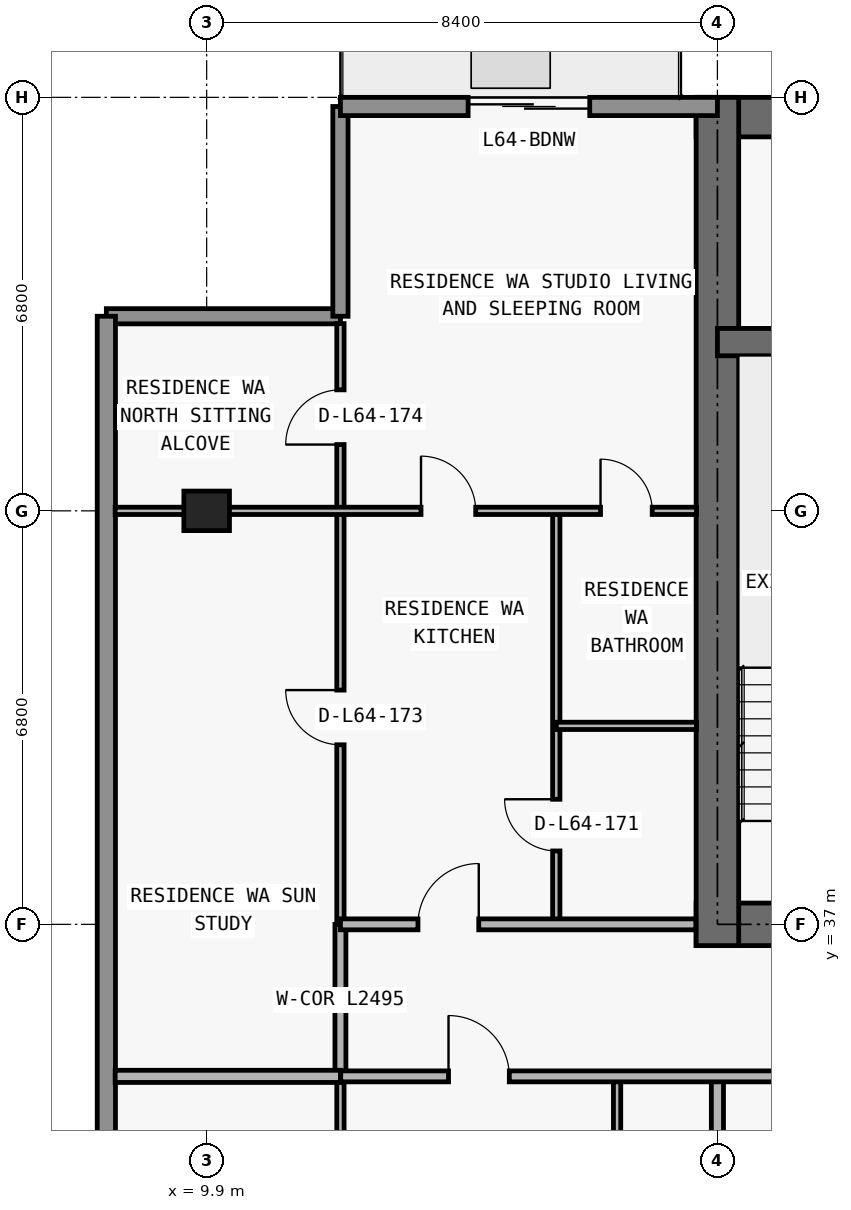
"""IFC4 building model, lengths in metres.
Left out: names, types, materials, properties, quantities, classifications, styles, units other than length and angle.
Written with IfcOpenShell. Run it as: python <this file> out.ifc"""

import sys

from ifc_helpers import new_model, si_unit, direction, frame, frame_2d, origin, origin_2d, place, context, subcontext, project, spatial, rectangle, extrude, element, fill, save


model = new_model("IFC4")
c1 = context("Model", 3, precision=1e-05, world=origin(), true_north=direction((0.0, 1.0)))
c2 = subcontext(c1, "Body", "Model", "MODEL_VIEW")
j1 = project(units=[si_unit("LENGTHUNIT", "METRE"), si_unit("PLANEANGLEUNIT", "RADIAN")], contexts=[c1])
p1 = place(None, origin())
s1 = spatial("IfcSite", under=j1, at=p1, CompositionType="ELEMENT")
p2 = place(p1, origin())
s2 = spatial("IfcBuilding", under=s1, at=p2, CompositionType="ELEMENT")
p3 = place(p2, frame((0.0, 0.0, 229.8)))
s3 = spatial("IfcBuildingStorey", under=s2, at=p3, CompositionType="ELEMENT", Elevation=229.8)
p4 = place(p3, frame((9.9, 43.8, 0.0), z_axis=(0.0, 0.0, 1.0), x_axis=(1.0, 0.0, 0.0)))
e1 = element("IfcColumn", 1, at=p4, inside=s3, PredefinedType="COLUMN", context=c2, shape_type="SweptSolid", body=[
    extrude(rectangle(XDim=0.75, YDim=0.65, at=origin_2d()), origin(), (0.0, 0.0, 1.0), 3.05),
])
p5 = place(p3, frame((17.95, 37.0, 0.0), z_axis=(0.0, 0.0, 1.0), x_axis=(1.0, 0.0, 0.0)))
e2 = element("IfcWall", 2, at=p5, inside=s3, PredefinedType="SHEAR", context=c2, shape_type="SweptSolid", body=[
    extrude(rectangle(XDim=41.9, YDim=0.7, at=frame_2d((20.95, 0.0))), origin(), (0.0, 0.0, 1.0), 3.05),
])
p6 = place(p5, frame((14.35, 0.0, 0.0)))
e3 = element("IfcOpeningElement", 3, at=p6, cuts=e2, PredefinedType="OPENING", context=c2, shape_type="SweptSolid", body=[
    extrude(rectangle(XDim=1.1, YDim=2.15, at=frame_2d((0.55, 1.075))), frame((0.0, 0.36, 0.0), z_axis=(0.0, -1.0, 0.0), x_axis=(1.0, 0.0, 0.0)), (0.0, 0.0, 1.0), 0.72),
])
p7 = place(p5, frame((6.2, 0.0, 0.0)))
e4 = element("IfcOpeningElement", 4, at=p7, cuts=e2, PredefinedType="OPENING", context=c2, shape_type="SweptSolid", body=[
    extrude(rectangle(XDim=1.05, YDim=2.15, at=frame_2d((0.525, 1.075))), frame((0.0, 0.36, 0.0), z_axis=(0.0, -1.0, 0.0), x_axis=(1.0, 0.0, 0.0)), (0.0, 0.0, 1.0), 0.72),
])
p8 = place(p5, frame((34.7, 0.0, 0.0)))
e5 = element("IfcOpeningElement", 5, at=p8, cuts=e2, PredefinedType="OPENING", context=c2, shape_type="SweptSolid", body=[
    extrude(rectangle(XDim=1.05, YDim=2.15, at=frame_2d((0.525, 1.075))), frame((0.0, 0.36, 0.0), z_axis=(0.0, -1.0, 0.0), x_axis=(1.0, 0.0, 0.0)), (0.0, 0.0, 1.0), 0.72),
])
p9 = place(p5, frame((10.812, 0.0, 0.0)))
e6 = element("IfcOpeningElement", 6, at=p9, cuts=e2, PredefinedType="OPENING", context=c2, shape_type="SweptSolid", body=[
    extrude(rectangle(XDim=1.05, YDim=2.15, at=frame_2d((0.525, 1.075))), frame((0.0, 0.36, 0.0), z_axis=(0.0, -1.0, 0.0), x_axis=(1.0, 0.0, 0.0)), (0.0, 0.0, 1.0), 0.72),
])
p10 = place(p5, frame((24.05, 0.0, 0.0)))
e7 = element("IfcOpeningElement", 7, at=p10, cuts=e2, PredefinedType="OPENING", context=c2, shape_type="SweptSolid", body=[
    extrude(rectangle(XDim=1.05, YDim=2.15, at=frame_2d((0.525, 1.075))), frame((0.0, 0.36, 0.0), z_axis=(0.0, -1.0, 0.0), x_axis=(1.0, 0.0, 0.0)), (0.0, 0.0, 1.0), 0.72),
])
p11 = place(p3, frame((17.95, 50.275, 0.0), z_axis=(0.0, 0.0, 1.0), x_axis=(1.0, 0.0, 0.0)))
e8 = element("IfcWall", 8, at=p11, inside=s3, PredefinedType="SHEAR", context=c2, shape_type="SweptSolid", body=[
    extrude(rectangle(XDim=41.9, YDim=0.65, at=frame_2d((20.95, 0.0))), origin(), (0.0, 0.0, 1.0), 3.05),
])
p12 = place(p3, frame((18.3, 36.65, 0.0), z_axis=(0.0, 0.0, 1.0), x_axis=(0.0, 1.0, 0.0)))
e9 = element("IfcWall", 9, at=p12, inside=s3, PredefinedType="SHEAR", context=c2, shape_type="SweptSolid", body=[
    extrude(rectangle(XDim=13.95, YDim=0.7, at=frame_2d((6.975, 0.0))), origin(), (0.0, 0.0, 1.0), 3.05),
])
p13 = place(p3, frame((18.3, 46.575, 0.0), z_axis=(0.0, 0.0, 1.0), x_axis=(1.0, 0.0, 0.0)))
e10 = element("IfcWall", 10, at=p13, inside=s3, PredefinedType="SHEAR", context=c2, shape_type="SweptSolid", body=[
    extrude(rectangle(XDim=41.2, YDim=0.45, at=frame_2d((20.6, 0.0))), origin(), (0.0, 0.0, 1.0), 3.05),
])
p14 = place(p13, frame((7.575, 0.0, 0.0)))
e11 = element("IfcOpeningElement", 11, at=p14, cuts=e10, PredefinedType="OPENING", context=c2, shape_type="SweptSolid", body=[
    extrude(rectangle(XDim=1.05, YDim=2.15, at=frame_2d((0.525, 1.075))), frame((0.0, 0.235, 0.0), z_axis=(0.0, -1.0, 0.0), x_axis=(1.0, 0.0, 0.0)), (0.0, 0.0, 1.0), 0.47),
])
p15 = place(p13, frame((32.625, 0.0, 0.0)))
e12 = element("IfcOpeningElement", 12, at=p15, cuts=e10, PredefinedType="OPENING", context=c2, shape_type="SweptSolid", body=[
    extrude(rectangle(XDim=1.05, YDim=2.15, at=frame_2d((0.525, 1.075))), frame((0.0, 0.235, 0.0), z_axis=(0.0, -1.0, 0.0), x_axis=(1.0, 0.0, 0.0)), (0.0, 0.0, 1.0), 0.47),
])
p16 = place(p3, frame((8.25, 47.0, 0.0), z_axis=(0.0, 0.0, 1.0), x_axis=(1.0, 0.0, 0.0)))
e13 = element("IfcWall", 13, at=p16, inside=s3, PredefinedType="ELEMENTEDWALL", context=c2, shape_type="SweptSolid", body=[
    extrude(rectangle(XDim=3.85, YDim=0.25, at=frame_2d((1.925, 0.0))), origin(), (0.0, 0.0, 1.0), 3.05),
])
p17 = place(p3, frame((12.1, 47.0, 0.0), z_axis=(0.0, 0.0, 1.0), x_axis=(0.0, 1.0, 0.0)))
e14 = element("IfcWall", 14, at=p17, inside=s3, PredefinedType="ELEMENTEDWALL", context=c2, shape_type="SweptSolid", body=[
    extrude(rectangle(XDim=3.45, YDim=0.25, at=frame_2d((1.725, 0.0))), origin(), (0.0, 0.0, 1.0), 3.05),
])
p18 = place(p3, frame((8.25, 30.15, 0.0), z_axis=(0.0, 0.0, 1.0), x_axis=(0.0, 1.0, 0.0)))
e15 = element("IfcWall", 15, at=p18, inside=s3, PredefinedType="STANDARD", context=c2, shape_type="SweptSolid", body=[
    extrude(rectangle(XDim=16.85, YDim=0.3, at=frame_2d((8.425, 0.0))), origin(), (0.0, 0.0, 1.0), 3.05),
])
p19 = place(p3, frame((12.1, 50.45, 0.0), z_axis=(0.0, 0.0, 1.0), x_axis=(1.0, 0.0, 0.0)))
e16 = element("IfcWall", 16, at=p19, inside=s3, PredefinedType="STANDARD", context=c2, shape_type="SweptSolid", body=[
    extrude(rectangle(XDim=6.2, YDim=0.3, at=frame_2d((3.1, 0.0))), origin(), (0.0, 0.0, 1.0), 3.05),
])
p20 = place(p19, frame((2.1, 0.0, 0.0)))
e17 = element("IfcOpeningElement", 17, at=p20, cuts=e16, PredefinedType="OPENING", context=c2, shape_type="SweptSolid", body=[
    extrude(rectangle(XDim=2.0, YDim=2.3, at=frame_2d((1.0, 1.15))), frame((0.0, 0.16, 0.0), z_axis=(0.0, -1.0, 0.0), x_axis=(1.0, 0.0, 0.0)), (0.0, 0.0, 1.0), 0.32),
])
p21 = place(p3, frame((12.1, 28.24, 0.0), z_axis=(0.0, 0.0, 1.0), x_axis=(0.0, 1.0, 0.0)))
e18 = element("IfcWall", 18, at=p21, inside=s3, PredefinedType="PARTITIONING", context=c2, shape_type="SweptSolid", body=[
    extrude(rectangle(XDim=6.26, YDim=0.12, at=frame_2d((3.13, 0.0))), origin(), (0.0, 0.0, 1.0), 3.05),
])
p22 = place(p3, frame((12.1, 34.505, 0.0), z_axis=(0.0, 0.0, 1.0), x_axis=(0.0, 1.0, 0.0)))
e19 = element("IfcWall", 19, at=p22, inside=s3, PredefinedType="PARTITIONING", context=c2, shape_type="SweptSolid", body=[
    extrude(rectangle(XDim=2.495, YDim=0.18, at=frame_2d((1.248, 0.0))), origin(), (0.0, 0.0, 1.0), 3.05),
])
p23 = place(p3, frame((12.1, 37.005, 0.0), z_axis=(0.0, 0.0, 1.0), x_axis=(0.0, 1.0, 0.0)))
e20 = element("IfcWall", 20, at=p23, inside=s3, PredefinedType="PARTITIONING", context=c2, shape_type="SweptSolid", body=[
    extrude(rectangle(XDim=9.875, YDim=0.12, at=frame_2d((4.938, 0.0))), origin(), (0.0, 0.0, 1.0), 3.05),
])
p24 = place(p23, frame((2.948, 0.0, 0.0)))
e21 = element("IfcOpeningElement", 21, at=p24, cuts=e20, PredefinedType="OPENING", context=c2, shape_type="SweptSolid", body=[
    extrude(rectangle(XDim=0.9, YDim=2.15, at=frame_2d((0.45, 1.075))), frame((0.0, 0.07, 0.0), z_axis=(0.0, -1.0, 0.0), x_axis=(1.0, 0.0, 0.0)), (0.0, 0.0, 1.0), 0.14),
])
p25 = place(p23, frame((7.885, 0.0, 0.0)))
e22 = element("IfcOpeningElement", 22, at=p25, cuts=e20, PredefinedType="OPENING", context=c2, shape_type="SweptSolid", body=[
    extrude(rectangle(XDim=0.9, YDim=2.15, at=frame_2d((0.45, 1.075))), frame((0.0, 0.07, 0.0), z_axis=(0.0, -1.0, 0.0), x_axis=(1.0, 0.0, 0.0)), (0.0, 0.0, 1.0), 0.14),
])
p26 = place(p3, frame((15.65, 37.0, 0.0), z_axis=(0.0, 0.0, 1.0), x_axis=(0.0, 1.0, 0.0)))
e23 = element("IfcWall", 23, at=p26, inside=s3, PredefinedType="PARTITIONING", context=c2, shape_type="SweptSolid", body=[
    extrude(rectangle(XDim=6.8, YDim=0.12, at=frame_2d((3.4, 0.0))), origin(), (0.0, 0.0, 1.0), 2.725),
])
p27 = place(p26, frame((1.207, 0.0, 0.0)))
e24 = element("IfcOpeningElement", 24, at=p27, cuts=e23, PredefinedType="OPENING", context=c2, shape_type="SweptSolid", body=[
    extrude(rectangle(XDim=0.85, YDim=2.1, at=frame_2d((0.425, 1.05))), frame((0.0, 0.07, 0.0), z_axis=(0.0, -1.0, 0.0), x_axis=(1.0, 0.0, 0.0)), (0.0, 0.0, 1.0), 0.14),
])
p28 = place(p3, frame((16.65, 28.24, 0.0), z_axis=(0.0, 0.0, 1.0), x_axis=(0.0, 1.0, 0.0)))
e25 = element("IfcWall", 25, at=p28, inside=s3, PredefinedType="PARTITIONING", context=c2, shape_type="SweptSolid", body=[
    extrude(rectangle(XDim=6.26, YDim=0.12, at=frame_2d((3.13, 0.0))), origin(), (0.0, 0.0, 1.0), 3.05),
])
p29 = place(p28, frame((2.705, 0.0, 0.0)))
e26 = element("IfcOpeningElement", 26, at=p29, cuts=e25, PredefinedType="OPENING", context=c2, shape_type="SweptSolid", body=[
    extrude(rectangle(XDim=0.85, YDim=2.1, at=frame_2d((0.425, 1.05))), frame((0.0, 0.07, 0.0), z_axis=(0.0, -1.0, 0.0), x_axis=(1.0, 0.0, 0.0)), (0.0, 0.0, 1.0), 0.14),
])
p30 = place(p3, frame((18.3, 28.24, 0.0), z_axis=(0.0, 0.0, 1.0), x_axis=(0.0, 1.0, 0.0)))
e27 = element("IfcWall", 27, at=p30, inside=s3, PredefinedType="PARTITIONING", context=c2, shape_type="SweptSolid", body=[
    extrude(rectangle(XDim=6.26, YDim=0.2, at=frame_2d((3.13, 0.0))), origin(), (0.0, 0.0, 1.0), 2.263),
])
p31 = place(p3, frame((8.395, 34.5, 0.0), z_axis=(0.0, 0.0, 1.0), x_axis=(1.0, 0.0, 0.0)))
e28 = element("IfcWall", 28, at=p31, inside=s3, PredefinedType="PARTITIONING", context=c2, shape_type="SweptSolid", body=[
    extrude(rectangle(XDim=3.705, YDim=0.2, at=frame_2d((1.853, 0.0))), origin(), (0.0, 0.0, 1.0), 3.05),
])
p32 = place(p3, frame((12.105, 34.5, 0.0), z_axis=(0.0, 0.0, 1.0), x_axis=(1.0, 0.0, 0.0)))
e29 = element("IfcWall", 29, at=p32, inside=s3, PredefinedType="PARTITIONING", context=c2, shape_type="SweptSolid", body=[
    extrude(rectangle(XDim=14.545, YDim=0.18, at=frame_2d((7.272, 0.0))), origin(), (0.0, 0.0, 1.0), 3.05),
])
p33 = place(p32, frame((1.772, 0.0, 0.0)))
e30 = element("IfcOpeningElement", 30, at=p33, cuts=e29, PredefinedType="OPENING", context=c2, shape_type="SweptSolid", body=[
    extrude(rectangle(XDim=1.0, YDim=2.2, at=frame_2d((0.5, 1.1))), frame((0.0, 0.1, 0.0), z_axis=(0.0, -1.0, 0.0), x_axis=(1.0, 0.0, 0.0)), (0.0, 0.0, 1.0), 0.2),
])
p34 = place(p32, frame((9.07, 0.0, 0.0)))
e31 = element("IfcOpeningElement", 31, at=p34, cuts=e29, PredefinedType="OPENING", context=c2, shape_type="SweptSolid", body=[
    extrude(rectangle(XDim=1.0, YDim=2.2, at=frame_2d((0.5, 1.1))), frame((0.0, 0.1, 0.0), z_axis=(0.0, -1.0, 0.0), x_axis=(1.0, 0.0, 0.0)), (0.0, 0.0, 1.0), 0.2),
])
p35 = place(p3, frame((12.1, 37.0, 0.0), z_axis=(0.0, 0.0, 1.0), x_axis=(1.0, 0.0, 0.0)))
e32 = element("IfcWall", 32, at=p35, inside=s3, PredefinedType="PARTITIONING", context=c2, shape_type="SweptSolid", body=[
    extrude(rectangle(XDim=5.845, YDim=0.18, at=frame_2d((2.922, 0.0))), origin(), (0.0, 0.0, 1.0), 3.05),
])
p36 = place(p35, frame((1.275, 0.0, 0.0)))
e33 = element("IfcOpeningElement", 33, at=p36, cuts=e32, PredefinedType="OPENING", context=c2, shape_type="SweptSolid", body=[
    extrude(rectangle(XDim=1.0, YDim=2.2, at=frame_2d((0.5, 1.1))), frame((0.0, 0.1, 0.0), z_axis=(0.0, -1.0, 0.0), x_axis=(1.0, 0.0, 0.0)), (0.0, 0.0, 1.0), 0.2),
])
p37 = place(p3, frame((15.65, 40.264, 0.0), z_axis=(0.0, 0.0, 1.0), x_axis=(1.0, 0.0, 0.0)))
e34 = element("IfcWall", 34, at=p37, inside=s3, PredefinedType="PARTITIONING", context=c2, shape_type="SweptSolid", body=[
    extrude(rectangle(XDim=2.305, YDim=0.12, at=frame_2d((1.153, 0.0))), origin(), (0.0, 0.0, 1.0), 3.05),
])
p38 = place(p3, frame((8.395, 43.8, 0.0), z_axis=(0.0, 0.0, 1.0), x_axis=(1.0, 0.0, 0.0)))
e35 = element("IfcWall", 35, at=p38, inside=s3, PredefinedType="PARTITIONING", context=c2, shape_type="SweptSolid", body=[
    extrude(rectangle(XDim=9.56, YDim=0.12, at=frame_2d((4.78, 0.0))), origin(), (0.0, 0.0, 1.0), 2.418),
])
p39 = place(p38, frame((5.03, 0.0, 0.0)))
e36 = element("IfcOpeningElement", 36, at=p39, cuts=e35, PredefinedType="OPENING", context=c2, shape_type="SweptSolid", body=[
    extrude(rectangle(XDim=0.9, YDim=2.15, at=frame_2d((0.45, 1.075))), frame((0.0, 0.07, 0.0), z_axis=(0.0, -1.0, 0.0), x_axis=(1.0, 0.0, 0.0)), (0.0, 0.0, 1.0), 0.14),
])
p40 = place(p38, frame((7.982, 0.0, 0.0)))
e37 = element("IfcOpeningElement", 37, at=p40, cuts=e35, PredefinedType="OPENING", context=c2, shape_type="SweptSolid", body=[
    extrude(rectangle(XDim=0.85, YDim=2.1, at=frame_2d((0.425, 1.05))), frame((0.0, 0.07, 0.0), z_axis=(0.0, -1.0, 0.0), x_axis=(1.0, 0.0, 0.0)), (0.0, 0.0, 1.0), 0.14),
])
p41 = place(p20, origin())
e38 = element("IfcDoor", 38, at=p41, inside=s3, OperationType="DOUBLE_DOOR_SLIDING", PredefinedType="DOOR", context=c2, shape_type="SweptSolid", body=[
    extrude(rectangle(XDim=2.0, YDim=2.3, at=frame_2d((1.0, 1.15))), frame((0.0, 0.025, 0.0), z_axis=(0.0, -1.0, 0.0), x_axis=(1.0, 0.0, 0.0)), (0.0, 0.0, 1.0), 0.05),
])
fill(e17, e38)
p42 = place(p33, origin())
e39 = element("IfcDoor", 39, at=p42, inside=s3, OperationType="SINGLE_SWING_LEFT", PredefinedType="DOOR", context=c2, shape_type="SweptSolid", body=[
    extrude(rectangle(XDim=1.0, YDim=2.2, at=frame_2d((0.5, 1.1))), frame((0.0, 0.025, 0.0), z_axis=(0.0, -1.0, 0.0), x_axis=(1.0, 0.0, 0.0)), (0.0, 0.0, 1.0), 0.05),
])
fill(e30, e39)
p43 = place(p36, origin())
e40 = element("IfcDoor", 40, at=p43, inside=s3, OperationType="SINGLE_SWING_RIGHT", PredefinedType="DOOR", context=c2, shape_type="SweptSolid", body=[
    extrude(rectangle(XDim=1.0, YDim=2.2, at=frame_2d((0.5, 1.1))), frame((0.0, 0.025, 0.0), z_axis=(0.0, -1.0, 0.0), x_axis=(1.0, 0.0, 0.0)), (0.0, 0.0, 1.0), 0.05),
])
fill(e33, e40)
p44 = place(p39, origin())
e41 = element("IfcDoor", 41, at=p44, inside=s3, OperationType="SINGLE_SWING_LEFT", PredefinedType="DOOR", context=c2, shape_type="SweptSolid", body=[
    extrude(rectangle(XDim=0.9, YDim=2.15, at=frame_2d((0.45, 1.075))), frame((0.0, 0.025, 0.0), z_axis=(0.0, -1.0, 0.0), x_axis=(1.0, 0.0, 0.0)), (0.0, 0.0, 1.0), 0.05),
])
fill(e36, e41)
p45 = place(p27, origin())
e42 = element("IfcDoor", 42, at=p45, inside=s3, OperationType="SINGLE_SWING_RIGHT", PredefinedType="DOOR", context=c2, shape_type="SweptSolid", body=[
    extrude(rectangle(XDim=0.85, YDim=2.1, at=frame_2d((0.425, 1.05))), frame((0.0, 0.025, 0.0), z_axis=(0.0, -1.0, 0.0), x_axis=(1.0, 0.0, 0.0)), (0.0, 0.0, 1.0), 0.05),
])
fill(e24, e42)
p46 = place(p40, origin())
e43 = element("IfcDoor", 43, at=p46, inside=s3, OperationType="SINGLE_SWING_LEFT", PredefinedType="DOOR", context=c2, shape_type="SweptSolid", body=[
    extrude(rectangle(XDim=0.85, YDim=2.1, at=frame_2d((0.425, 1.05))), frame((0.0, 0.025, 0.0), z_axis=(0.0, -1.0, 0.0), x_axis=(1.0, 0.0, 0.0)), (0.0, 0.0, 1.0), 0.05),
])
fill(e37, e43)
p47 = place(p24, origin())
e44 = element("IfcDoor", 44, at=p47, inside=s3, OperationType="SINGLE_SWING_RIGHT", PredefinedType="DOOR", context=c2, shape_type="SweptSolid", body=[
    extrude(rectangle(XDim=0.9, YDim=2.15, at=frame_2d((0.45, 1.075))), frame((0.0, 0.025, 0.0), z_axis=(0.0, -1.0, 0.0), x_axis=(1.0, 0.0, 0.0)), (0.0, 0.0, 1.0), 0.05),
])
fill(e21, e44)
p48 = place(p25, origin())
e45 = element("IfcDoor", 45, at=p48, inside=s3, OperationType="SINGLE_SWING_LEFT", PredefinedType="DOOR", context=c2, shape_type="SweptSolid", body=[
    extrude(rectangle(XDim=0.9, YDim=2.15, at=frame_2d((0.45, 1.075))), frame((0.0, 0.025, 0.0), z_axis=(0.0, -1.0, 0.0), x_axis=(1.0, 0.0, 0.0)), (0.0, 0.0, 1.0), 0.05),
])
fill(e22, e45)
save(model, sys.argv[1])
